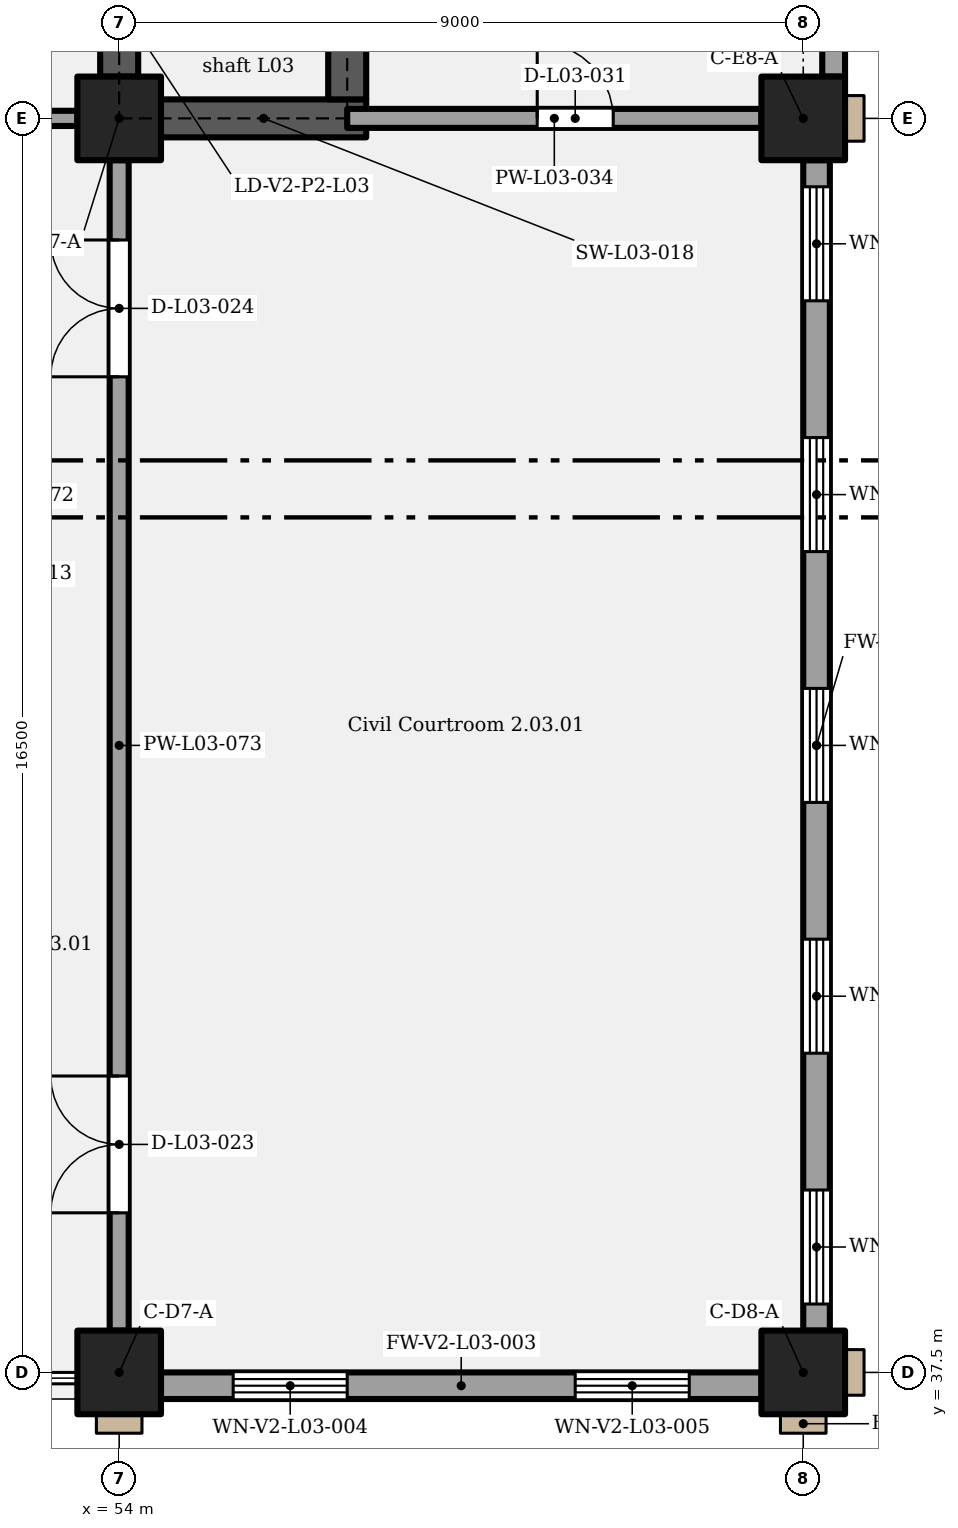
"""IFC4 building model, lengths in metres.
Left out: names, types, materials, properties, quantities, classifications, styles, units other than length and angle.
Written with IfcOpenShell. Run it as: python <this file> out.ifc"""

import sys

from ifc_helpers import new_model, si_unit, direction, frame, frame_2d, origin, origin_2d, place, context, subcontext, project, spatial, rectangle, extrude, element, fill, save


model = new_model("IFC4")
c1 = context("Model", 3, precision=1e-05, world=origin(), true_north=direction((0.0, 1.0)))
c2 = subcontext(c1, "Body", "Model", "MODEL_VIEW")
j1 = project(units=[si_unit("LENGTHUNIT", "METRE"), si_unit("PLANEANGLEUNIT", "RADIAN")], contexts=[c1])
p1 = place(None, origin())
s1 = spatial("IfcSite", under=j1, at=p1, CompositionType="ELEMENT")
p2 = place(p1, origin())
s2 = spatial("IfcBuilding", under=s1, at=p2, CompositionType="ELEMENT")
p3 = place(p2, frame((0.0, 0.0, 17.4)))
s3 = spatial("IfcBuildingStorey", under=s2, at=p3, CompositionType="ELEMENT", Elevation=17.4)
for number, where, z_axis, x_axis in (
    (1, (54.0, 37.5, 0.0), (0.0, 0.0, 1.0), (1.0, 0.0, 0.0)),
    (2, (63.0, 37.5, 0.0), (0.0, 0.0, 1.0), (1.0, 0.0, 0.0)),
    (3, (54.0, 54.0, 0.0), (0.0, 0.0, 1.0), (1.0, 0.0, 0.0)),
    (4, (63.0, 54.0, 0.0), (0.0, 0.0, 1.0), (1.0, 0.0, 0.0)),
):
    element("IfcColumn", number, at=place(p3, frame(where, z_axis=z_axis, x_axis=x_axis)), inside=s3, PredefinedType="COLUMN", context=c2, shape_type="SweptSolid", body=[
        extrude(rectangle(XDim=1.1, YDim=1.1, at=origin_2d()), origin(), (0.0, 0.0, 1.0), 5.4),
    ])
p4 = place(p3, frame((54.55, 54.0, 0.0), z_axis=(0.0, 0.0, 1.0), x_axis=(1.0, 0.0, 0.0)))
e5 = element("IfcWall", 5, at=p4, inside=s3, PredefinedType="SHEAR", context=c2, shape_type="SweptSolid", body=[
    extrude(rectangle(XDim=2.7, YDim=0.5, at=frame_2d((1.35, 0.0))), origin(), (0.0, 0.0, 1.0), 5.15),
])
p5 = place(p3, frame((57.0, 54.25, 0.0), z_axis=(0.0, 0.0, 1.0), x_axis=(0.0, 1.0, 0.0)))
e6 = element("IfcWall", 6, at=p5, inside=s3, PredefinedType="SHEAR", context=c2, shape_type="SweptSolid", body=[
    extrude(rectangle(XDim=2.5, YDim=0.5, at=frame_2d((1.25, 0.0))), origin(), (0.0, 0.0, 1.0), 5.15),
])
p6 = place(p3, frame((54.0, 54.55, 0.0), z_axis=(0.0, 0.0, 1.0), x_axis=(0.0, 1.0, 0.0)))
e7 = element("IfcWall", 7, at=p6, inside=s3, PredefinedType="SHEAR", context=c2, shape_type="SweptSolid", body=[
    extrude(rectangle(XDim=11.0, YDim=0.5, at=frame_2d((5.5, 0.0))), origin(), (0.0, 0.0, 1.0), 5.15),
])
p7 = place(p6, frame((0.4, 0.0, 0.0)))
e8 = element("IfcOpeningElement", 8, at=p7, cuts=e7, PredefinedType="OPENING", context=c2, shape_type="SweptSolid", body=[
    extrude(rectangle(XDim=1.1, YDim=2.1, at=frame_2d((0.55, 1.05))), frame((0.0, 0.26, 0.0), z_axis=(0.0, -1.0, 0.0), x_axis=(1.0, 0.0, 0.0)), (0.0, 0.0, 1.0), 0.52),
])
p8 = place(p6, frame((2.85, 0.0, 0.0)))
e9 = element("IfcOpeningElement", 9, at=p8, cuts=e7, PredefinedType="OPENING", context=c2, shape_type="SweptSolid", body=[
    extrude(rectangle(XDim=1.2, YDim=2.1, at=frame_2d((0.6, 1.05))), frame((0.0, 0.26, 0.0), z_axis=(0.0, -1.0, 0.0), x_axis=(1.0, 0.0, 0.0)), (0.0, 0.0, 1.0), 0.52),
])
p9 = place(p3, frame((54.55, 37.325, 0.0), z_axis=(0.0, 0.0, 1.0), x_axis=(1.0, 0.0, 0.0)))
e10 = element("IfcWall", 10, at=p9, inside=s3, PredefinedType="SOLIDWALL", context=c2, shape_type="SweptSolid", body=[
    extrude(rectangle(XDim=7.9, YDim=0.35, at=frame_2d((3.95, 0.0))), origin(), (0.0, 0.0, 1.0), 5.15),
])
p10 = place(p9, frame((0.95, 0.0, 1.05)))
e11 = element("IfcOpeningElement", 11, at=p10, cuts=e10, PredefinedType="OPENING", context=c2, shape_type="SweptSolid", body=[
    extrude(rectangle(XDim=1.5, YDim=3.5, at=frame_2d((0.75, 1.75))), frame((0.0, 0.185, 0.0), z_axis=(0.0, -1.0, 0.0), x_axis=(1.0, 0.0, 0.0)), (0.0, 0.0, 1.0), 0.37),
])
p11 = place(p9, frame((5.45, 0.0, 1.05)))
e12 = element("IfcOpeningElement", 12, at=p11, cuts=e10, PredefinedType="OPENING", context=c2, shape_type="SweptSolid", body=[
    extrude(rectangle(XDim=1.5, YDim=3.5, at=frame_2d((0.75, 1.75))), frame((0.0, 0.185, 0.0), z_axis=(0.0, -1.0, 0.0), x_axis=(1.0, 0.0, 0.0)), (0.0, 0.0, 1.0), 0.37),
])
p12 = place(p3, frame((63.175, 38.05, 0.0), z_axis=(0.0, 0.0, 1.0), x_axis=(0.0, 1.0, 0.0)))
e13 = element("IfcWall", 13, at=p12, inside=s3, PredefinedType="SOLIDWALL", context=c2, shape_type="SweptSolid", body=[
    extrude(rectangle(XDim=15.4, YDim=0.35, at=frame_2d((7.7, 0.0))), origin(), (0.0, 0.0, 1.0), 5.15),
])
p13 = place(p12, frame((0.35, 0.0, 1.05)))
e14 = element("IfcOpeningElement", 14, at=p13, cuts=e13, PredefinedType="OPENING", context=c2, shape_type="SweptSolid", body=[
    extrude(rectangle(XDim=1.5, YDim=3.5, at=frame_2d((0.75, 1.75))), frame((0.0, 0.185, 0.0), z_axis=(0.0, -1.0, 0.0), x_axis=(1.0, 0.0, 0.0)), (0.0, 0.0, 1.0), 0.37),
])
p14 = place(p12, frame((3.65, 0.0, 1.05)))
e15 = element("IfcOpeningElement", 15, at=p14, cuts=e13, PredefinedType="OPENING", context=c2, shape_type="SweptSolid", body=[
    extrude(rectangle(XDim=1.5, YDim=3.5, at=frame_2d((0.75, 1.75))), frame((0.0, 0.185, 0.0), z_axis=(0.0, -1.0, 0.0), x_axis=(1.0, 0.0, 0.0)), (0.0, 0.0, 1.0), 0.37),
])
p15 = place(p12, frame((6.95, 0.0, 1.05)))
e16 = element("IfcOpeningElement", 16, at=p15, cuts=e13, PredefinedType="OPENING", context=c2, shape_type="SweptSolid", body=[
    extrude(rectangle(XDim=1.5, YDim=3.5, at=frame_2d((0.75, 1.75))), frame((0.0, 0.185, 0.0), z_axis=(0.0, -1.0, 0.0), x_axis=(1.0, 0.0, 0.0)), (0.0, 0.0, 1.0), 0.37),
])
p16 = place(p12, frame((10.25, 0.0, 1.05)))
e17 = element("IfcOpeningElement", 17, at=p16, cuts=e13, PredefinedType="OPENING", context=c2, shape_type="SweptSolid", body=[
    extrude(rectangle(XDim=1.5, YDim=3.5, at=frame_2d((0.75, 1.75))), frame((0.0, 0.185, 0.0), z_axis=(0.0, -1.0, 0.0), x_axis=(1.0, 0.0, 0.0)), (0.0, 0.0, 1.0), 0.37),
])
p17 = place(p12, frame((13.55, 0.0, 1.05)))
e18 = element("IfcOpeningElement", 18, at=p17, cuts=e13, PredefinedType="OPENING", context=c2, shape_type="SweptSolid", body=[
    extrude(rectangle(XDim=1.5, YDim=3.5, at=frame_2d((0.75, 1.75))), frame((0.0, 0.185, 0.0), z_axis=(0.0, -1.0, 0.0), x_axis=(1.0, 0.0, 0.0)), (0.0, 0.0, 1.0), 0.37),
])
p18 = place(p3, frame((63.4, 54.55, 0.0), z_axis=(0.0, 0.0, 1.0), x_axis=(0.0, 1.0, 0.0)))
e19 = element("IfcWall", 19, at=p18, inside=s3, PredefinedType="SOLIDWALL", context=c2, shape_type="SweptSolid", body=[
    extrude(rectangle(XDim=2.45, YDim=0.3, at=frame_2d((1.225, 0.0))), origin(), (0.0, 0.0, 1.0), 5.15),
])
p19 = place(p18, frame((0.425, 0.0, 1.05)))
e20 = element("IfcOpeningElement", 20, at=p19, cuts=e19, PredefinedType="OPENING", context=c2, shape_type="SweptSolid", body=[
    extrude(rectangle(XDim=1.05, YDim=2.4, at=frame_2d((0.525, 1.2))), frame((0.0, 0.16, 0.0), z_axis=(0.0, -1.0, 0.0), x_axis=(1.0, 0.0, 0.0)), (0.0, 0.0, 1.0), 0.32),
])
p20 = place(p3, frame((49.5, 54.0, 0.0), z_axis=(0.0, 0.0, 1.0), x_axis=(1.0, 0.0, 0.0)))
e21 = element("IfcWall", 21, at=p20, inside=s3, PredefinedType="PARTITIONING", context=c2, shape_type="SweptSolid", body=[
    extrude(rectangle(XDim=3.95, YDim=0.2, at=frame_2d((1.975, 0.0))), origin(), (0.0, 0.0, 1.0), 4.4),
])
p21 = place(p20, frame((1.35, 0.0, 0.0)))
e22 = element("IfcOpeningElement", 22, at=p21, cuts=e21, PredefinedType="OPENING", context=c2, shape_type="SweptSolid", body=[
    extrude(rectangle(XDim=1.8, YDim=2.1, at=frame_2d((0.9, 1.05))), frame((0.0, 0.11, 0.0), z_axis=(0.0, -1.0, 0.0), x_axis=(1.0, 0.0, 0.0)), (0.0, 0.0, 1.0), 0.22),
])
p22 = place(p3, frame((57.0, 54.0, 0.0), z_axis=(0.0, 0.0, 1.0), x_axis=(1.0, 0.0, 0.0)))
e23 = element("IfcWall", 23, at=p22, inside=s3, PredefinedType="PARTITIONING", context=c2, shape_type="SweptSolid", body=[
    extrude(rectangle(XDim=5.45, YDim=0.25, at=frame_2d((2.725, 0.0))), origin(), (0.0, 0.0, 1.0), 4.4),
])
p23 = place(p22, frame((2.5, 0.0, 0.0)))
e24 = element("IfcOpeningElement", 24, at=p23, cuts=e23, PredefinedType="OPENING", context=c2, shape_type="SweptSolid", body=[
    extrude(rectangle(XDim=1.0, YDim=2.1, at=frame_2d((0.5, 1.05))), frame((0.0, 0.135, 0.0), z_axis=(0.0, -1.0, 0.0), x_axis=(1.0, 0.0, 0.0)), (0.0, 0.0, 1.0), 0.27),
])
p24 = place(p3, frame((54.0, 38.05, 0.0), z_axis=(0.0, 0.0, 1.0), x_axis=(0.0, 1.0, 0.0)))
e25 = element("IfcWall", 25, at=p24, inside=s3, PredefinedType="PARTITIONING", context=c2, shape_type="SweptSolid", body=[
    extrude(rectangle(XDim=15.4, YDim=0.25, at=frame_2d((7.7, 0.0))), origin(), (0.0, 0.0, 1.0), 4.2),
])
p25 = place(p24, frame((1.55, 0.0, 0.0)))
e26 = element("IfcOpeningElement", 26, at=p25, cuts=e25, PredefinedType="OPENING", context=c2, shape_type="SweptSolid", body=[
    extrude(rectangle(XDim=1.8, YDim=2.4, at=frame_2d((0.9, 1.2))), frame((0.0, 0.135, 0.0), z_axis=(0.0, -1.0, 0.0), x_axis=(1.0, 0.0, 0.0)), (0.0, 0.0, 1.0), 0.27),
])
p26 = place(p24, frame((12.55, 0.0, 0.0)))
e27 = element("IfcOpeningElement", 27, at=p26, cuts=e25, PredefinedType="OPENING", context=c2, shape_type="SweptSolid", body=[
    extrude(rectangle(XDim=1.8, YDim=2.4, at=frame_2d((0.9, 1.2))), frame((0.0, 0.135, 0.0), z_axis=(0.0, -1.0, 0.0), x_axis=(1.0, 0.0, 0.0)), (0.0, 0.0, 1.0), 0.27),
])
p27 = place(p10, origin())
e28 = element("IfcWindow", 28, at=p27, inside=s3, PartitioningType="SINGLE_PANEL", PredefinedType="WINDOW", context=c2, shape_type="SweptSolid", body=[
    extrude(rectangle(XDim=1.5, YDim=3.5, at=frame_2d((0.75, 1.75))), frame((0.0, 0.03, 0.0), z_axis=(0.0, -1.0, 0.0), x_axis=(1.0, 0.0, 0.0)), (0.0, 0.0, 1.0), 0.06),
])
fill(e11, e28)
p28 = place(p11, origin())
e29 = element("IfcWindow", 29, at=p28, inside=s3, PartitioningType="SINGLE_PANEL", PredefinedType="WINDOW", context=c2, shape_type="SweptSolid", body=[
    extrude(rectangle(XDim=1.5, YDim=3.5, at=frame_2d((0.75, 1.75))), frame((0.0, 0.03, 0.0), z_axis=(0.0, -1.0, 0.0), x_axis=(1.0, 0.0, 0.0)), (0.0, 0.0, 1.0), 0.06),
])
fill(e12, e29)
p29 = place(p13, origin())
e30 = element("IfcWindow", 30, at=p29, inside=s3, PartitioningType="SINGLE_PANEL", PredefinedType="WINDOW", context=c2, shape_type="SweptSolid", body=[
    extrude(rectangle(XDim=1.5, YDim=3.5, at=frame_2d((0.75, 1.75))), frame((0.0, 0.03, 0.0), z_axis=(0.0, -1.0, 0.0), x_axis=(1.0, 0.0, 0.0)), (0.0, 0.0, 1.0), 0.06),
])
fill(e14, e30)
p30 = place(p14, origin())
e31 = element("IfcWindow", 31, at=p30, inside=s3, PartitioningType="SINGLE_PANEL", PredefinedType="WINDOW", context=c2, shape_type="SweptSolid", body=[
    extrude(rectangle(XDim=1.5, YDim=3.5, at=frame_2d((0.75, 1.75))), frame((0.0, 0.03, 0.0), z_axis=(0.0, -1.0, 0.0), x_axis=(1.0, 0.0, 0.0)), (0.0, 0.0, 1.0), 0.06),
])
fill(e15, e31)
p31 = place(p15, origin())
e32 = element("IfcWindow", 32, at=p31, inside=s3, PartitioningType="SINGLE_PANEL", PredefinedType="WINDOW", context=c2, shape_type="SweptSolid", body=[
    extrude(rectangle(XDim=1.5, YDim=3.5, at=frame_2d((0.75, 1.75))), frame((0.0, 0.03, 0.0), z_axis=(0.0, -1.0, 0.0), x_axis=(1.0, 0.0, 0.0)), (0.0, 0.0, 1.0), 0.06),
])
fill(e16, e32)
p32 = place(p16, origin())
e33 = element("IfcWindow", 33, at=p32, inside=s3, PartitioningType="SINGLE_PANEL", PredefinedType="WINDOW", context=c2, shape_type="SweptSolid", body=[
    extrude(rectangle(XDim=1.5, YDim=3.5, at=frame_2d((0.75, 1.75))), frame((0.0, 0.03, 0.0), z_axis=(0.0, -1.0, 0.0), x_axis=(1.0, 0.0, 0.0)), (0.0, 0.0, 1.0), 0.06),
])
fill(e17, e33)
p33 = place(p17, origin())
e34 = element("IfcWindow", 34, at=p33, inside=s3, PartitioningType="SINGLE_PANEL", PredefinedType="WINDOW", context=c2, shape_type="SweptSolid", body=[
    extrude(rectangle(XDim=1.5, YDim=3.5, at=frame_2d((0.75, 1.75))), frame((0.0, 0.03, 0.0), z_axis=(0.0, -1.0, 0.0), x_axis=(1.0, 0.0, 0.0)), (0.0, 0.0, 1.0), 0.06),
])
fill(e18, e34)
p34 = place(p25, origin())
e35 = element("IfcDoor", 35, at=p34, inside=s3, OperationType="DOUBLE_DOOR_SINGLE_SWING", PredefinedType="DOOR", context=c2, shape_type="SweptSolid", body=[
    extrude(rectangle(XDim=1.8, YDim=2.4, at=frame_2d((0.9, 1.2))), frame((0.0, 0.025, 0.0), z_axis=(0.0, -1.0, 0.0), x_axis=(1.0, 0.0, 0.0)), (0.0, 0.0, 1.0), 0.05),
])
fill(e26, e35)
p35 = place(p26, origin())
e36 = element("IfcDoor", 36, at=p35, inside=s3, OperationType="DOUBLE_DOOR_SINGLE_SWING", PredefinedType="DOOR", context=c2, shape_type="SweptSolid", body=[
    extrude(rectangle(XDim=1.8, YDim=2.4, at=frame_2d((0.9, 1.2))), frame((0.0, 0.025, 0.0), z_axis=(0.0, -1.0, 0.0), x_axis=(1.0, 0.0, 0.0)), (0.0, 0.0, 1.0), 0.05),
])
fill(e27, e36)
p36 = place(p23, origin())
e37 = element("IfcDoor", 37, at=p36, inside=s3, OperationType="SINGLE_SWING_LEFT", PredefinedType="DOOR", context=c2, shape_type="SweptSolid", body=[
    extrude(rectangle(XDim=1.0, YDim=2.1, at=frame_2d((0.5, 1.05))), frame((0.0, 0.025, 0.0), z_axis=(0.0, -1.0, 0.0), x_axis=(1.0, 0.0, 0.0)), (0.0, 0.0, 1.0), 0.05),
])
fill(e24, e37)
save(model, sys.argv[1])
